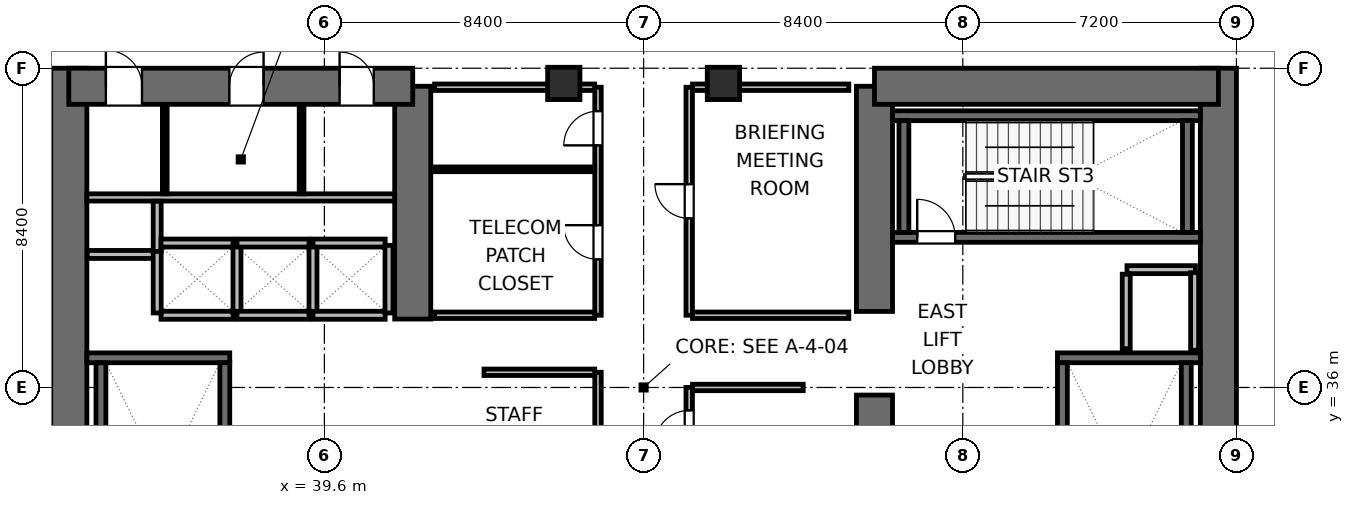
"""IFC4 building model, lengths in metres.
Left out: names, types, materials, properties, quantities, classifications, styles, units other than length and angle.
Written with IfcOpenShell. Run it as: python <this file> out.ifc"""

import sys

from ifc_helpers import new_model, si_unit, direction, frame, frame_2d, origin, origin_2d, place, context, subcontext, project, spatial, rectangle, extrude, element, fill, save


model = new_model("IFC4")
c1 = context("Model", 3, precision=1e-05, world=origin(), true_north=direction((0.0, 1.0)))
c2 = subcontext(c1, "Body", "Model", "MODEL_VIEW")
j1 = project(units=[si_unit("LENGTHUNIT", "METRE"), si_unit("PLANEANGLEUNIT", "RADIAN")], contexts=[c1])
p1 = place(None, origin())
s1 = spatial("IfcSite", under=j1, at=p1, CompositionType="ELEMENT")
p2 = place(p1, origin())
s2 = spatial("IfcBuilding", under=s1, at=p2, CompositionType="ELEMENT")
p3 = place(p2, frame((0.0, 0.0, 68.4)))
s3 = spatial("IfcBuildingStorey", under=s2, at=p3, CompositionType="ELEMENT", Elevation=68.4)
p4 = place(p3, frame((32.875, 27.6, 0.0), z_axis=(0.0, 0.0, 1.0), x_axis=(0.0, 1.0, 0.0)))
e1 = element("IfcWall", 1, at=p4, inside=s3, PredefinedType="SHEAR", context=c2, shape_type="SweptSolid", body=[
    extrude(rectangle(XDim=16.8, YDim=0.95, at=frame_2d((8.4, 0.0))), origin(), (0.0, 0.0, 1.0), 4.5),
])
p5 = place(p3, frame((41.925, 37.8, 0.0), z_axis=(0.0, 0.0, 1.0), x_axis=(0.0, 1.0, 0.0)))
e2 = element("IfcWall", 2, at=p5, inside=s3, PredefinedType="SHEAR", context=c2, shape_type="SweptSolid", body=[
    extrude(rectangle(XDim=6.125, YDim=0.95, at=frame_2d((3.062, 0.0))), origin(), (0.0, 0.0, 1.0), 4.5),
])
p6 = place(p3, frame((32.875, 43.925, 0.0), z_axis=(0.0, 0.0, 1.0), x_axis=(1.0, 0.0, 0.0)))
e3 = element("IfcWall", 3, at=p6, inside=s3, PredefinedType="SHEAR", context=c2, shape_type="SweptSolid", body=[
    extrude(rectangle(XDim=9.05, YDim=0.95, at=frame_2d((4.525, 0.0))), origin(), (0.0, 0.0, 1.0), 4.5),
])
p7 = place(p6, frame((0.975, 0.0, 0.0)))
e4 = element("IfcOpeningElement", 4, at=p7, cuts=e3, PredefinedType="OPENING", context=c2, shape_type="SweptSolid", body=[
    extrude(rectangle(XDim=0.95, YDim=2.04, at=frame_2d((0.475, 1.02))), frame((0.0, 0.485, 0.0), z_axis=(0.0, -1.0, 0.0), x_axis=(1.0, 0.0, 0.0)), (0.0, 0.0, 1.0), 0.97),
])
p8 = place(p6, frame((4.225, 0.0, 0.0)))
e5 = element("IfcOpeningElement", 5, at=p8, cuts=e3, PredefinedType="OPENING", context=c2, shape_type="SweptSolid", body=[
    extrude(rectangle(XDim=0.9, YDim=2.02, at=frame_2d((0.45, 1.01))), frame((0.0, 0.485, 0.0), z_axis=(0.0, -1.0, 0.0), x_axis=(1.0, 0.0, 0.0)), (0.0, 0.0, 1.0), 0.97),
])
p9 = place(p6, frame((7.125, 0.0, 0.0)))
e6 = element("IfcOpeningElement", 6, at=p9, cuts=e3, PredefinedType="OPENING", context=c2, shape_type="SweptSolid", body=[
    extrude(rectangle(XDim=0.9, YDim=2.02, at=frame_2d((0.45, 1.01))), frame((0.0, 0.485, 0.0), z_axis=(0.0, -1.0, 0.0), x_axis=(1.0, 0.0, 0.0)), (0.0, 0.0, 1.0), 0.97),
])
p10 = place(p3, frame((54.075, 28.075, 0.0), z_axis=(0.0, 0.0, 1.0), x_axis=(0.0, 1.0, 0.0)))
e7 = element("IfcWall", 7, at=p10, inside=s3, PredefinedType="SHEAR", context=c2, shape_type="SweptSolid", body=[
    extrude(rectangle(XDim=7.725, YDim=0.95, at=frame_2d((3.863, 0.0))), origin(), (0.0, 0.0, 1.0), 4.5),
])
p11 = place(p3, frame((54.075, 38.0, 0.0), z_axis=(0.0, 0.0, 1.0), x_axis=(0.0, 1.0, 0.0)))
e8 = element("IfcWall", 8, at=p11, inside=s3, PredefinedType="SHEAR", context=c2, shape_type="SweptSolid", body=[
    extrude(rectangle(XDim=5.925, YDim=0.95, at=frame_2d((2.962, 0.0))), origin(), (0.0, 0.0, 1.0), 4.5),
])
p12 = place(p3, frame((63.125, 27.6, 0.0), z_axis=(0.0, 0.0, 1.0), x_axis=(0.0, 1.0, 0.0)))
e9 = element("IfcWall", 9, at=p12, inside=s3, PredefinedType="SHEAR", context=c2, shape_type="SweptSolid", body=[
    extrude(rectangle(XDim=16.8, YDim=0.95, at=frame_2d((8.4, 0.0))), origin(), (0.0, 0.0, 1.0), 4.5),
])
p13 = place(p3, frame((54.075, 43.925, 0.0), z_axis=(0.0, 0.0, 1.0), x_axis=(1.0, 0.0, 0.0)))
e10 = element("IfcWall", 10, at=p13, inside=s3, PredefinedType="SHEAR", context=c2, shape_type="SweptSolid", body=[
    extrude(rectangle(XDim=9.05, YDim=0.95, at=frame_2d((4.525, 0.0))), origin(), (0.0, 0.0, 1.0), 4.5),
])
p14 = place(p3, frame((33.35, 36.78, 0.0), z_axis=(0.0, 0.0, 1.0), x_axis=(1.0, 0.0, 0.0)))
e11 = element("IfcWall", 11, at=p14, inside=s3, PredefinedType="SHEAR", context=c2, shape_type="SweptSolid", body=[
    extrude(rectangle(XDim=3.76, YDim=0.26, at=frame_2d((1.88, 0.0))), origin(), (0.0, 0.0, 1.0), 4.5),
])
p15 = place(p3, frame((33.72, 29.05, 0.0), z_axis=(0.0, 0.0, 1.0), x_axis=(0.0, 1.0, 0.0)))
e12 = element("IfcWall", 12, at=p15, inside=s3, PredefinedType="SHEAR", context=c2, shape_type="SweptSolid", body=[
    extrude(rectangle(XDim=7.6, YDim=0.26, at=frame_2d((3.8, 0.0))), origin(), (0.0, 0.0, 1.0), 4.5),
])
p16 = place(p3, frame((36.98, 29.05, 0.0), z_axis=(0.0, 0.0, 1.0), x_axis=(0.0, 1.0, 0.0)))
e13 = element("IfcWall", 13, at=p16, inside=s3, PredefinedType="SHEAR", context=c2, shape_type="SweptSolid", body=[
    extrude(rectangle(XDim=7.6, YDim=0.26, at=frame_2d((3.8, 0.0))), origin(), (0.0, 0.0, 1.0), 4.5),
])
p17 = place(p16, frame((0.3, 0.0, 0.0)))
e14 = element("IfcOpeningElement", 14, at=p17, cuts=e13, PredefinedType="OPENING", context=c2, shape_type="SweptSolid", body=[
    extrude(rectangle(XDim=1.0, YDim=2.04, at=frame_2d((0.5, 1.02))), frame((0.0, 0.14, 0.0), z_axis=(0.0, -1.0, 0.0), x_axis=(1.0, 0.0, 0.0)), (0.0, 0.0, 1.0), 0.28),
])
p18 = place(p3, frame((58.89, 36.78, 0.0), z_axis=(0.0, 0.0, 1.0), x_axis=(1.0, 0.0, 0.0)))
e15 = element("IfcWall", 15, at=p18, inside=s3, PredefinedType="SHEAR", context=c2, shape_type="SweptSolid", body=[
    extrude(rectangle(XDim=3.76, YDim=0.26, at=frame_2d((1.88, 0.0))), origin(), (0.0, 0.0, 1.0), 4.5),
])
p19 = place(p3, frame((59.02, 29.05, 0.0), z_axis=(0.0, 0.0, 1.0), x_axis=(0.0, 1.0, 0.0)))
e16 = element("IfcWall", 16, at=p19, inside=s3, PredefinedType="SHEAR", context=c2, shape_type="SweptSolid", body=[
    extrude(rectangle(XDim=7.6, YDim=0.26, at=frame_2d((3.8, 0.0))), origin(), (0.0, 0.0, 1.0), 4.5),
])
p20 = place(p19, frame((0.3, 0.0, 0.0)))
e17 = element("IfcOpeningElement", 17, at=p20, cuts=e16, PredefinedType="OPENING", context=c2, shape_type="SweptSolid", body=[
    extrude(rectangle(XDim=1.0, YDim=2.04, at=frame_2d((0.5, 1.02))), frame((0.0, 0.14, 0.0), z_axis=(0.0, -1.0, 0.0), x_axis=(1.0, 0.0, 0.0)), (0.0, 0.0, 1.0), 0.28),
])
p21 = place(p3, frame((62.28, 29.05, 0.0), z_axis=(0.0, 0.0, 1.0), x_axis=(0.0, 1.0, 0.0)))
e18 = element("IfcWall", 18, at=p21, inside=s3, PredefinedType="SHEAR", context=c2, shape_type="SweptSolid", body=[
    extrude(rectangle(XDim=7.6, YDim=0.26, at=frame_2d((3.8, 0.0))), origin(), (0.0, 0.0, 1.0), 4.5),
])
p22 = place(p3, frame((54.55, 39.95, 0.0), z_axis=(0.0, 0.0, 1.0), x_axis=(1.0, 0.0, 0.0)))
e19 = element("IfcWall", 19, at=p22, inside=s3, PredefinedType="SHEAR", context=c2, shape_type="SweptSolid", body=[
    extrude(rectangle(XDim=8.1, YDim=0.26, at=frame_2d((4.05, 0.0))), origin(), (0.0, 0.0, 1.0), 4.5),
])
p23 = place(p22, frame((0.65, 0.0, 0.0)))
e20 = element("IfcOpeningElement", 20, at=p23, cuts=e19, PredefinedType="OPENING", context=c2, shape_type="SweptSolid", body=[
    extrude(rectangle(XDim=1.0, YDim=2.04, at=frame_2d((0.5, 1.02))), frame((0.0, 0.14, 0.0), z_axis=(0.0, -1.0, 0.0), x_axis=(1.0, 0.0, 0.0)), (0.0, 0.0, 1.0), 0.28),
])
p24 = place(p3, frame((54.55, 43.15, 0.0), z_axis=(0.0, 0.0, 1.0), x_axis=(1.0, 0.0, 0.0)))
e21 = element("IfcWall", 21, at=p24, inside=s3, PredefinedType="SHEAR", context=c2, shape_type="SweptSolid", body=[
    extrude(rectangle(XDim=8.1, YDim=0.26, at=frame_2d((4.05, 0.0))), origin(), (0.0, 0.0, 1.0), 4.5),
])
for number, where, z_axis, x_axis in (
    (22, (54.85, 40.08, 0.0), (0.0, 0.0, 1.0), (0.0, 1.0, 0.0)),
    (23, (62.31, 40.08, 0.0), (0.0, 0.0, 1.0), (0.0, 1.0, 0.0)),
):
    element("IfcWall", number, at=place(p3, frame(where, z_axis=z_axis, x_axis=x_axis)), inside=s3, PredefinedType="SHEAR", context=c2, shape_type="SweptSolid", body=[
        extrude(rectangle(XDim=2.94, YDim=0.26, at=frame_2d((1.47, 0.0))), origin(), (0.0, 0.0, 1.0), 4.5),
    ])
for number, where, z_axis, x_axis in (
    (24, (45.9, 44.0, 0.0), (0.0, 0.0, 1.0), (1.0, 0.0, 0.0)),
    (25, (50.1, 44.0, 0.0), (0.0, 0.0, 1.0), (1.0, 0.0, 0.0)),
):
    element("IfcColumn", number, at=place(p3, frame(where, z_axis=z_axis, x_axis=x_axis)), inside=s3, PredefinedType="COLUMN", context=c2, shape_type="SweptSolid", body=[
        extrude(rectangle(XDim=0.85, YDim=0.85, at=origin_2d()), origin(), (0.0, 0.0, 1.0), 4.5),
    ])
p25 = place(p3, frame((33.35, 41.0, 0.0), z_axis=(0.0, 0.0, 1.0), x_axis=(1.0, 0.0, 0.0)))
e26 = element("IfcWall", 26, at=p25, inside=s3, PredefinedType="PLUMBINGWALL", context=c2, shape_type="SweptSolid", body=[
    extrude(rectangle(XDim=8.1, YDim=0.19, at=frame_2d((4.05, 0.0))), origin(), (0.0, 0.0, 1.0), 4.24),
])
for number, where, z_axis, x_axis in (
    (27, (35.4, 41.095, 0.0), (0.0, 0.0, 1.0), (0.0, 1.0, 0.0)),
    (28, (39.0, 41.095, 0.0), (0.0, 0.0, 1.0), (0.0, 1.0, 0.0)),
):
    element("IfcWall", number, at=place(p3, frame(where, z_axis=z_axis, x_axis=x_axis)), inside=s3, PredefinedType="PARTITIONING", context=c2, shape_type="SweptSolid", body=[
        extrude(rectangle(XDim=2.355, YDim=0.125, at=frame_2d((1.177, 0.0))), origin(), (0.0, 0.0, 1.0), 4.24),
    ])
p26 = place(p3, frame((33.36, 39.5, 0.0), z_axis=(0.0, 0.0, 1.0), x_axis=(1.0, 0.0, 0.0)))
e29 = element("IfcWall", 29, at=p26, inside=s3, PredefinedType="PARTITIONING", context=c2, shape_type="SweptSolid", body=[
    extrude(rectangle(XDim=1.86, YDim=0.21, at=frame_2d((0.93, 0.0))), origin(), (0.0, 0.0, 1.0), 4.24),
])
p27 = place(p3, frame((35.2, 39.58, 0.0), z_axis=(0.0, 0.0, 1.0), x_axis=(0.0, 1.0, 0.0)))
e30 = element("IfcWall", 30, at=p27, inside=s3, PredefinedType="PARTITIONING", context=c2, shape_type="SweptSolid", body=[
    extrude(rectangle(XDim=1.32, YDim=0.21, at=frame_2d((0.66, 0.0))), origin(), (0.0, 0.0, 1.0), 4.24),
])
p28 = place(p3, frame((60.72, 39.1, 0.0), z_axis=(0.0, 0.0, 1.0), x_axis=(1.0, 0.0, 0.0)))
e31 = element("IfcWall", 31, at=p28, inside=s3, PredefinedType="PARTITIONING", context=c2, shape_type="SweptSolid", body=[
    extrude(rectangle(XDim=1.8, YDim=0.21, at=frame_2d((0.9, 0.0))), origin(), (0.0, 0.0, 1.0), 4.24),
])
p29 = place(p3, frame((60.7, 37.02, 0.0), z_axis=(0.0, 0.0, 1.0), x_axis=(0.0, 1.0, 0.0)))
e32 = element("IfcWall", 32, at=p29, inside=s3, PredefinedType="PARTITIONING", context=c2, shape_type="SweptSolid", body=[
    extrude(rectangle(XDim=1.96, YDim=0.21, at=frame_2d((0.98, 0.0))), origin(), (0.0, 0.0, 1.0), 4.24),
])
p30 = place(p3, frame((62.5, 36.98, 0.0), z_axis=(0.0, 0.0, 1.0), x_axis=(0.0, 1.0, 0.0)))
e33 = element("IfcWall", 33, at=p30, inside=s3, PredefinedType="PARTITIONING", context=c2, shape_type="SweptSolid", body=[
    extrude(rectangle(XDim=2.04, YDim=0.21, at=frame_2d((1.02, 0.0))), origin(), (0.0, 0.0, 1.0), 4.24),
])
for number, where, z_axis, x_axis in (
    (34, (35.3, 37.9, 0.0), (0.0, 0.0, 1.0), (1.0, 0.0, 0.0)),
    (35, (35.3, 39.8, 0.0), (0.0, 0.0, 1.0), (1.0, 0.0, 0.0)),
):
    element("IfcWall", number, at=place(p3, frame(where, z_axis=z_axis, x_axis=x_axis)), inside=s3, PredefinedType="PARTITIONING", context=c2, shape_type="SweptSolid", body=[
        extrude(rectangle(XDim=1.9, YDim=0.21, at=frame_2d((0.95, 0.0))), origin(), (0.0, 0.0, 1.0), 4.24),
    ])
p31 = place(p3, frame((35.2, 37.96, 0.0), z_axis=(0.0, 0.0, 1.0), x_axis=(0.0, 1.0, 0.0)))
e36 = element("IfcWall", 36, at=p31, inside=s3, PredefinedType="PARTITIONING", context=c2, shape_type="SweptSolid", body=[
    extrude(rectangle(XDim=1.62, YDim=0.21, at=frame_2d((0.81, 0.0))), origin(), (0.0, 0.0, 1.0), 4.24),
])
p32 = place(p3, frame((37.3, 37.96, 0.0), z_axis=(0.0, 0.0, 1.0), x_axis=(0.0, 1.0, 0.0)))
e37 = element("IfcWall", 37, at=p32, inside=s3, PredefinedType="PARTITIONING", context=c2, shape_type="SweptSolid", body=[
    extrude(rectangle(XDim=1.78, YDim=0.21, at=frame_2d((0.89, 0.0))), origin(), (0.0, 0.0, 1.0), 4.24),
])
for number, where, z_axis, x_axis in (
    (38, (37.3, 37.9, 0.0), (0.0, 0.0, 1.0), (1.0, 0.0, 0.0)),
    (39, (37.3, 39.8, 0.0), (0.0, 0.0, 1.0), (1.0, 0.0, 0.0)),
):
    element("IfcWall", number, at=place(p3, frame(where, z_axis=z_axis, x_axis=x_axis)), inside=s3, PredefinedType="PARTITIONING", context=c2, shape_type="SweptSolid", body=[
        extrude(rectangle(XDim=1.9, YDim=0.21, at=frame_2d((0.95, 0.0))), origin(), (0.0, 0.0, 1.0), 4.24),
    ])
p33 = place(p3, frame((39.3, 37.96, 0.0), z_axis=(0.0, 0.0, 1.0), x_axis=(0.0, 1.0, 0.0)))
e40 = element("IfcWall", 40, at=p33, inside=s3, PredefinedType="PARTITIONING", context=c2, shape_type="SweptSolid", body=[
    extrude(rectangle(XDim=1.78, YDim=0.21, at=frame_2d((0.89, 0.0))), origin(), (0.0, 0.0, 1.0), 4.24),
])
for number, where, z_axis, x_axis in (
    (41, (39.3, 37.9, 0.0), (0.0, 0.0, 1.0), (1.0, 0.0, 0.0)),
    (42, (39.3, 39.8, 0.0), (0.0, 0.0, 1.0), (1.0, 0.0, 0.0)),
):
    element("IfcWall", number, at=place(p3, frame(where, z_axis=z_axis, x_axis=x_axis)), inside=s3, PredefinedType="PARTITIONING", context=c2, shape_type="SweptSolid", body=[
        extrude(rectangle(XDim=1.9, YDim=0.21, at=frame_2d((0.95, 0.0))), origin(), (0.0, 0.0, 1.0), 4.24),
    ])
p34 = place(p3, frame((41.3, 37.96, 0.0), z_axis=(0.0, 0.0, 1.0), x_axis=(0.0, 1.0, 0.0)))
e43 = element("IfcWall", 43, at=p34, inside=s3, PredefinedType="PARTITIONING", context=c2, shape_type="SweptSolid", body=[
    extrude(rectangle(XDim=1.78, YDim=0.21, at=frame_2d((0.89, 0.0))), origin(), (0.0, 0.0, 1.0), 4.24),
])
p35 = place(p3, frame((46.8, 32.6, 0.0), z_axis=(0.0, 0.0, 1.0), x_axis=(0.0, 1.0, 0.0)))
e44 = element("IfcWall", 44, at=p35, inside=s3, PredefinedType="PARTITIONING", context=c2, shape_type="SweptSolid", body=[
    extrude(rectangle(XDim=3.8, YDim=0.17, at=frame_2d((1.9, 0.0))), origin(), (0.0, 0.0, 1.0), 4.24),
])
p36 = place(p35, frame((1.45, 0.0, 0.0)))
e45 = element("IfcOpeningElement", 45, at=p36, cuts=e44, PredefinedType="OPENING", context=c2, shape_type="SweptSolid", body=[
    extrude(rectangle(XDim=0.9, YDim=2.02, at=frame_2d((0.45, 1.01))), frame((0.0, 0.095, 0.0), z_axis=(0.0, -1.0, 0.0), x_axis=(1.0, 0.0, 0.0)), (0.0, 0.0, 1.0), 0.19),
])
p37 = place(p3, frame((43.8, 36.4, 0.0), z_axis=(0.0, 0.0, 1.0), x_axis=(1.0, 0.0, 0.0)))
e46 = element("IfcWall", 46, at=p37, inside=s3, PredefinedType="PARTITIONING", context=c2, shape_type="SweptSolid", body=[
    extrude(rectangle(XDim=2.913, YDim=0.17, at=frame_2d((1.457, 0.0))), origin(), (0.0, 0.0, 1.0), 4.24),
])
p38 = place(p3, frame((49.2, 32.6, 0.0), z_axis=(0.0, 0.0, 1.0), x_axis=(0.0, 1.0, 0.0)))
e47 = element("IfcWall", 47, at=p38, inside=s3, PredefinedType="PARTITIONING", context=c2, shape_type="SweptSolid", body=[
    extrude(rectangle(XDim=3.4, YDim=0.17, at=frame_2d((1.7, 0.0))), origin(), (0.0, 0.0, 1.0), 4.24),
])
p39 = place(p38, frame((0.196, 0.0, 0.0)))
e48 = element("IfcOpeningElement", 48, at=p39, cuts=e47, PredefinedType="OPENING", context=c2, shape_type="SweptSolid", body=[
    extrude(rectangle(XDim=0.9, YDim=2.02, at=frame_2d((0.45, 1.01))), frame((0.0, 0.095, 0.0), z_axis=(0.0, -1.0, 0.0), x_axis=(1.0, 0.0, 0.0)), (0.0, 0.0, 1.0), 0.19),
])
p40 = place(p38, frame((1.896, 0.0, 0.0)))
e49 = element("IfcOpeningElement", 49, at=p40, cuts=e47, PredefinedType="OPENING", context=c2, shape_type="SweptSolid", body=[
    extrude(rectangle(XDim=0.9, YDim=2.02, at=frame_2d((0.45, 1.01))), frame((0.0, 0.095, 0.0), z_axis=(0.0, -1.0, 0.0), x_axis=(1.0, 0.0, 0.0)), (0.0, 0.0, 1.0), 0.19),
])
p41 = place(p3, frame((49.287, 36.0, 0.0), z_axis=(0.0, 0.0, 1.0), x_axis=(1.0, 0.0, 0.0)))
e50 = element("IfcWall", 50, at=p41, inside=s3, PredefinedType="PARTITIONING", context=c2, shape_type="SweptSolid", body=[
    extrude(rectangle(XDim=2.913, YDim=0.17, at=frame_2d((1.457, 0.0))), origin(), (0.0, 0.0, 1.0), 4.24),
])
p42 = place(p3, frame((46.8, 37.9, 0.0), z_axis=(0.0, 0.0, 1.0), x_axis=(0.0, 1.0, 0.0)))
e51 = element("IfcWall", 51, at=p42, inside=s3, PredefinedType="PARTITIONING", context=c2, shape_type="SweptSolid", body=[
    extrude(rectangle(XDim=6.0, YDim=0.17, at=frame_2d((3.0, 0.0))), origin(), (0.0, 0.0, 1.0), 4.24),
])
p43 = place(p42, frame((1.47, 0.0, 0.0)))
e52 = element("IfcOpeningElement", 52, at=p43, cuts=e51, PredefinedType="OPENING", context=c2, shape_type="SweptSolid", body=[
    extrude(rectangle(XDim=0.9, YDim=2.02, at=frame_2d((0.45, 1.01))), frame((0.0, 0.095, 0.0), z_axis=(0.0, -1.0, 0.0), x_axis=(1.0, 0.0, 0.0)), (0.0, 0.0, 1.0), 0.19),
])
p44 = place(p42, frame((4.47, 0.0, 0.0)))
e53 = element("IfcOpeningElement", 53, at=p44, cuts=e51, PredefinedType="OPENING", context=c2, shape_type="SweptSolid", body=[
    extrude(rectangle(XDim=0.9, YDim=2.02, at=frame_2d((0.45, 1.01))), frame((0.0, 0.095, 0.0), z_axis=(0.0, -1.0, 0.0), x_axis=(1.0, 0.0, 0.0)), (0.0, 0.0, 1.0), 0.19),
])
p45 = place(p3, frame((42.5, 37.9, 0.0), z_axis=(0.0, 0.0, 1.0), x_axis=(1.0, 0.0, 0.0)))
e54 = element("IfcWall", 54, at=p45, inside=s3, PredefinedType="PARTITIONING", context=c2, shape_type="SweptSolid", body=[
    extrude(rectangle(XDim=4.213, YDim=0.17, at=frame_2d((2.106, 0.0))), origin(), (0.0, 0.0, 1.0), 4.24),
])
p46 = place(p3, frame((42.5, 43.9, 0.0), z_axis=(0.0, 0.0, 1.0), x_axis=(1.0, 0.0, 0.0)))
e55 = element("IfcWall", 55, at=p46, inside=s3, PredefinedType="PARTITIONING", context=c2, shape_type="SweptSolid", body=[
    extrude(rectangle(XDim=4.213, YDim=0.17, at=frame_2d((2.106, 0.0))), origin(), (0.0, 0.0, 1.0), 3.125),
])
p47 = place(p3, frame((42.5, 41.74, 0.0), z_axis=(0.0, 0.0, 1.0), x_axis=(1.0, 0.0, 0.0)))
e56 = element("IfcWall", 56, at=p47, inside=s3, PredefinedType="PARTITIONING", context=c2, shape_type="SweptSolid", body=[
    extrude(rectangle(XDim=4.213, YDim=0.125, at=frame_2d((2.106, 0.0))), origin(), (0.0, 0.0, 1.0), 4.24),
])
p48 = place(p3, frame((49.2, 37.9, 0.0), z_axis=(0.0, 0.0, 1.0), x_axis=(0.0, 1.0, 0.0)))
e57 = element("IfcWall", 57, at=p48, inside=s3, PredefinedType="PARTITIONING", context=c2, shape_type="SweptSolid", body=[
    extrude(rectangle(XDim=6.0, YDim=0.17, at=frame_2d((3.0, 0.0))), origin(), (0.0, 0.0, 1.0), 4.24),
])
p49 = place(p48, frame((2.55, 0.0, 0.0)))
e58 = element("IfcOpeningElement", 58, at=p49, cuts=e57, PredefinedType="OPENING", context=c2, shape_type="SweptSolid", body=[
    extrude(rectangle(XDim=0.9, YDim=2.02, at=frame_2d((0.45, 1.01))), frame((0.0, 0.095, 0.0), z_axis=(0.0, -1.0, 0.0), x_axis=(1.0, 0.0, 0.0)), (0.0, 0.0, 1.0), 0.19),
])
p50 = place(p3, frame((49.287, 37.9, 0.0), z_axis=(0.0, 0.0, 1.0), x_axis=(1.0, 0.0, 0.0)))
e59 = element("IfcWall", 59, at=p50, inside=s3, PredefinedType="PARTITIONING", context=c2, shape_type="SweptSolid", body=[
    extrude(rectangle(XDim=4.113, YDim=0.17, at=frame_2d((2.056, 0.0))), origin(), (0.0, 0.0, 1.0), 4.24),
])
p51 = place(p3, frame((49.287, 43.9, 0.0), z_axis=(0.0, 0.0, 1.0), x_axis=(1.0, 0.0, 0.0)))
e60 = element("IfcWall", 60, at=p51, inside=s3, PredefinedType="PARTITIONING", context=c2, shape_type="SweptSolid", body=[
    extrude(rectangle(XDim=4.113, YDim=0.17, at=frame_2d((2.056, 0.0))), origin(), (0.0, 0.0, 1.0), 3.125),
])
p52 = place(p23, origin())
e61 = element("IfcDoor", 61, at=p52, inside=s3, OperationType="SINGLE_SWING_LEFT", PredefinedType="DOOR", context=c2, shape_type="SweptSolid", body=[
    extrude(rectangle(XDim=1.0, YDim=2.04, at=frame_2d((0.5, 1.02))), frame((0.0, 0.025, 0.0), z_axis=(0.0, -1.0, 0.0), x_axis=(1.0, 0.0, 0.0)), (0.0, 0.0, 1.0), 0.05),
])
fill(e20, e61)
p53 = place(p7, origin())
e62 = element("IfcDoor", 62, at=p53, inside=s3, OperationType="SINGLE_SWING_LEFT", PredefinedType="DOOR", context=c2, shape_type="SweptSolid", body=[
    extrude(rectangle(XDim=0.95, YDim=2.04, at=frame_2d((0.475, 1.02))), frame((0.0, 0.025, 0.0), z_axis=(0.0, -1.0, 0.0), x_axis=(1.0, 0.0, 0.0)), (0.0, 0.0, 1.0), 0.05),
])
fill(e4, e62)
p54 = place(p8, origin())
e63 = element("IfcDoor", 63, at=p54, inside=s3, OperationType="SINGLE_SWING_RIGHT", PredefinedType="DOOR", context=c2, shape_type="SweptSolid", body=[
    extrude(rectangle(XDim=0.9, YDim=2.02, at=frame_2d((0.45, 1.01))), frame((0.0, 0.025, 0.0), z_axis=(0.0, -1.0, 0.0), x_axis=(1.0, 0.0, 0.0)), (0.0, 0.0, 1.0), 0.05),
])
fill(e5, e63)
p55 = place(p9, origin())
e64 = element("IfcDoor", 64, at=p55, inside=s3, OperationType="SINGLE_SWING_LEFT", PredefinedType="DOOR", context=c2, shape_type="SweptSolid", body=[
    extrude(rectangle(XDim=0.9, YDim=2.02, at=frame_2d((0.45, 1.01))), frame((0.0, 0.025, 0.0), z_axis=(0.0, -1.0, 0.0), x_axis=(1.0, 0.0, 0.0)), (0.0, 0.0, 1.0), 0.05),
])
fill(e6, e64)
p56 = place(p40, origin())
e65 = element("IfcDoor", 65, at=p56, inside=s3, OperationType="SINGLE_SWING_LEFT", PredefinedType="DOOR", context=c2, shape_type="SweptSolid", body=[
    extrude(rectangle(XDim=0.9, YDim=2.02, at=frame_2d((0.45, 1.01))), frame((0.0, 0.025, 0.0), z_axis=(0.0, -1.0, 0.0), x_axis=(1.0, 0.0, 0.0)), (0.0, 0.0, 1.0), 0.05),
])
fill(e49, e65)
p57 = place(p43, origin())
e66 = element("IfcDoor", 66, at=p57, inside=s3, OperationType="SINGLE_SWING_RIGHT", PredefinedType="DOOR", context=c2, shape_type="SweptSolid", body=[
    extrude(rectangle(XDim=0.9, YDim=2.02, at=frame_2d((0.45, 1.01))), frame((0.0, 0.025, 0.0), z_axis=(0.0, -1.0, 0.0), x_axis=(1.0, 0.0, 0.0)), (0.0, 0.0, 1.0), 0.05),
])
fill(e52, e66)
p58 = place(p44, origin())
e67 = element("IfcDoor", 67, at=p58, inside=s3, OperationType="SINGLE_SWING_LEFT", PredefinedType="DOOR", context=c2, shape_type="SweptSolid", body=[
    extrude(rectangle(XDim=0.9, YDim=2.02, at=frame_2d((0.45, 1.01))), frame((0.0, 0.025, 0.0), z_axis=(0.0, -1.0, 0.0), x_axis=(1.0, 0.0, 0.0)), (0.0, 0.0, 1.0), 0.05),
])
fill(e53, e67)
p59 = place(p49, origin())
e68 = element("IfcDoor", 68, at=p59, inside=s3, OperationType="SINGLE_SWING_RIGHT", PredefinedType="DOOR", context=c2, shape_type="SweptSolid", body=[
    extrude(rectangle(XDim=0.9, YDim=2.02, at=frame_2d((0.45, 1.01))), frame((0.0, 0.025, 0.0), z_axis=(0.0, -1.0, 0.0), x_axis=(1.0, 0.0, 0.0)), (0.0, 0.0, 1.0), 0.05),
])
fill(e58, e68)
save(model, sys.argv[1])
